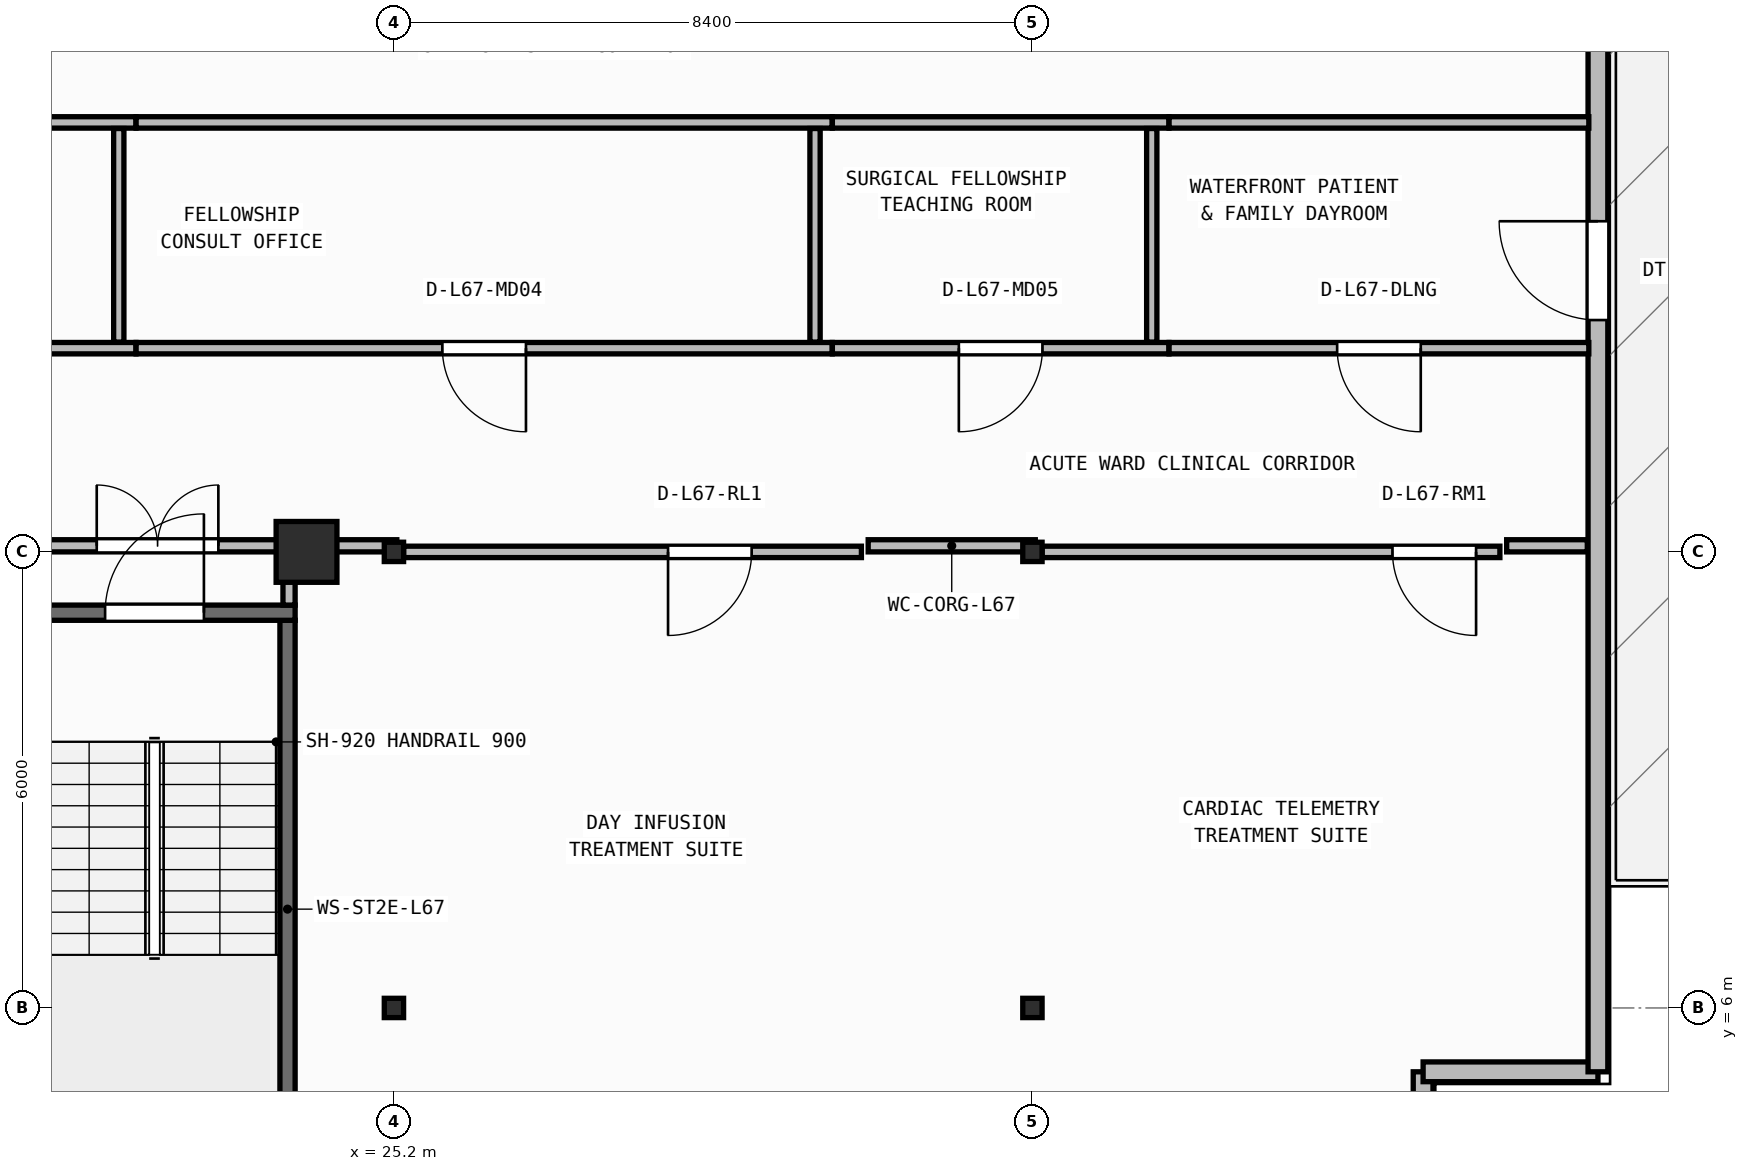
"""IFC4 building model, lengths in metres.
Left out: names, types, materials, properties, quantities, classifications, styles, units other than length and angle.
Written with IfcOpenShell. Run it as: python <this file> out.ifc"""

import sys

from ifc_helpers import new_model, si_unit, direction, frame, frame_2d, origin, origin_2d, place, context, subcontext, project, spatial, rectangle, i_section, extrude, element, fill, save


model = new_model("IFC4")
c1 = context("Model", 3, precision=1e-05, world=origin(), true_north=direction((0.0, 1.0)))
c2 = subcontext(c1, "Body", "Model", "MODEL_VIEW")
j1 = project(units=[si_unit("LENGTHUNIT", "METRE"), si_unit("PLANEANGLEUNIT", "RADIAN")], contexts=[c1])
p1 = place(None, origin())
s1 = spatial("IfcSite", under=j1, at=p1, CompositionType="ELEMENT")
p2 = place(p1, origin())
s2 = spatial("IfcBuilding", under=s1, at=p2, CompositionType="ELEMENT")
p3 = place(p2, frame((0.0, 0.0, 272.35)))
s3 = spatial("IfcBuildingStorey", under=s2, at=p3, CompositionType="ELEMENT", Elevation=272.35)
for number, where, z_axis, x_axis in (
    (1, (25.2, 6.0, 0.0), (0.0, 0.0, 1.0), (1.0, 0.0, 0.0)),
    (2, (33.6, 6.0, 0.0), (0.0, 0.0, 1.0), (1.0, 0.0, 0.0)),
):
    element("IfcColumn", number, at=place(p3, frame(where, z_axis=z_axis, x_axis=x_axis)), inside=s3, PredefinedType="COLUMN", context=c2, shape_type="SweptSolid", body=[
        extrude(i_section(OverallWidth=0.254, OverallDepth=0.254, WebThickness=0.009, FlangeThickness=0.014, FilletRadius=0.013, at=origin_2d()), origin(), (0.0, 0.0, 1.0), 3.95),
    ])
p4 = place(p3, frame((24.05, 12.0, 0.0), z_axis=(0.0, 0.0, 1.0), x_axis=(1.0, 0.0, 0.0)))
e3 = element("IfcColumn", 3, at=p4, inside=s3, PredefinedType="COLUMN", context=c2, shape_type="SweptSolid", body=[
    extrude(rectangle(XDim=0.8, YDim=0.8, at=origin_2d()), origin(), (0.0, 0.0, 1.0), 3.95),
])
for number, where, z_axis, x_axis in (
    (4, (25.2, 12.0, 0.0), (0.0, 0.0, 1.0), (1.0, 0.0, 0.0)),
    (5, (33.6, 12.0, 0.0), (0.0, 0.0, 1.0), (1.0, 0.0, 0.0)),
):
    element("IfcColumn", number, at=place(p3, frame(where, z_axis=z_axis, x_axis=x_axis)), inside=s3, PredefinedType="COLUMN", context=c2, shape_type="SweptSolid", body=[
        extrude(i_section(OverallWidth=0.254, OverallDepth=0.254, WebThickness=0.009, FlangeThickness=0.014, FilletRadius=0.013, at=origin_2d()), origin(), (0.0, 0.0, 1.0), 3.95),
    ])
p5 = place(p3, frame((38.74, 2.849, 0.0), z_axis=(0.0, 0.0, 1.0), x_axis=(0.0, 1.0, 0.0)))
e6 = element("IfcWall", 6, at=p5, inside=s3, PredefinedType="STANDARD", context=c2, shape_type="SweptSolid", body=[
    extrude(rectangle(XDim=2.311, YDim=0.26, at=frame_2d((1.156, 0.0))), origin(), (0.0, 0.0, 1.0), 3.71),
])
p6 = place(p3, frame((38.74, 5.16, 0.0), z_axis=(0.0, 0.0, 1.0), x_axis=(1.0, 0.0, 0.0)))
e7 = element("IfcWall", 7, at=p6, inside=s3, PredefinedType="STANDARD", context=c2, shape_type="SweptSolid", body=[
    extrude(rectangle(XDim=2.3, YDim=0.26, at=frame_2d((1.15, 0.0))), origin(), (0.0, 0.0, 1.0), 3.71),
])
p7 = place(p3, frame((41.04, 5.16, 0.0), z_axis=(0.0, 0.0, 1.0), x_axis=(0.0, 1.0, 0.0)))
e8 = element("IfcWall", 8, at=p7, inside=s3, PredefinedType="STANDARD", context=c2, shape_type="SweptSolid", body=[
    extrude(rectangle(XDim=21.08, YDim=0.26, at=frame_2d((10.54, 0.0))), origin(), (0.0, 0.0, 1.0), 3.71),
])
p8 = place(p7, frame((9.89, 0.0, 0.0)))
e9 = element("IfcOpeningElement", 9, at=p8, cuts=e8, PredefinedType="OPENING", context=c2, shape_type="SweptSolid", body=[
    extrude(rectangle(XDim=1.3, YDim=2.15, at=frame_2d((0.65, 1.075))), frame((0.0, 0.14, 0.0), z_axis=(0.0, -1.0, 0.0), x_axis=(1.0, 0.0, 0.0)), (0.0, 0.0, 1.0), 0.28),
])
p9 = place(p3, frame((23.8, 3.5, 0.0), z_axis=(0.0, 0.0, 1.0), x_axis=(0.0, 1.0, 0.0)))
e10 = element("IfcWall", 10, at=p9, inside=s3, PredefinedType="SHEAR", context=c2, shape_type="SweptSolid", body=[
    extrude(rectangle(XDim=7.6, YDim=0.2, at=frame_2d((3.8, 0.0))), origin(), (0.0, 0.0, 1.0), 3.71),
])
p10 = place(p3, frame((20.2, 11.2, 0.0), z_axis=(0.0, 0.0, 1.0), x_axis=(1.0, 0.0, 0.0)))
e11 = element("IfcWall", 11, at=p10, inside=s3, PredefinedType="SHEAR", context=c2, shape_type="SweptSolid", body=[
    extrude(rectangle(XDim=3.7, YDim=0.2, at=frame_2d((1.85, 0.0))), origin(), (0.0, 0.0, 1.0), 3.71),
])
p11 = place(p10, frame((1.2, 0.0, 0.0)))
e12 = element("IfcOpeningElement", 12, at=p11, cuts=e11, PredefinedType="OPENING", context=c2, shape_type="SweptSolid", body=[
    extrude(rectangle(XDim=1.3, YDim=2.15, at=frame_2d((0.65, 1.075))), frame((0.0, 0.11, 0.0), z_axis=(0.0, -1.0, 0.0), x_axis=(1.0, 0.0, 0.0)), (0.0, 0.0, 1.0), 0.22),
])
p12 = place(p3, frame((20.28, 12.08, 0.0), z_axis=(0.0, 0.0, 1.0), x_axis=(1.0, 0.0, 0.0)))
e13 = element("IfcWall", 13, at=p12, inside=s3, PredefinedType="PARTITIONING", context=c2, shape_type="SweptSolid", body=[
    extrude(rectangle(XDim=3.62, YDim=0.16, at=frame_2d((1.81, 0.0))), origin(), (0.0, 0.0, 1.0), 3.157),
])
p13 = place(p12, frame((1.01, 0.0, 0.0)))
e14 = element("IfcOpeningElement", 14, at=p13, cuts=e13, PredefinedType="OPENING", context=c2, shape_type="SweptSolid", body=[
    extrude(rectangle(XDim=1.6, YDim=2.05, at=frame_2d((0.8, 1.025))), frame((0.0, 0.09, 0.0), z_axis=(0.0, -1.0, 0.0), x_axis=(1.0, 0.0, 0.0)), (0.0, 0.0, 1.0), 0.18),
])
p14 = place(p3, frame((23.82, 11.3, 0.0), z_axis=(0.0, 0.0, 1.0), x_axis=(0.0, 1.0, 0.0)))
e15 = element("IfcWall", 15, at=p14, inside=s3, PredefinedType="PARTITIONING", context=c2, shape_type="SweptSolid", body=[
    extrude(rectangle(XDim=0.7, YDim=0.16, at=frame_2d((0.35, 0.0))), origin(), (0.0, 0.0, 1.0), 3.71),
])
p15 = place(p3, frame((31.35, 12.0, 0.0), z_axis=(0.0, 0.0, 1.0), x_axis=(-1.0, 0.0, 0.0)))
e16 = element("IfcWall", 16, at=p15, inside=s3, PredefinedType="PARTITIONING", context=c2, shape_type="SweptSolid", body=[
    extrude(rectangle(XDim=6.023, YDim=0.15, at=frame_2d((3.012, 0.0))), origin(), (0.0, 0.0, 1.0), 3.157),
])
p16 = place(p15, frame((1.444, 0.0, 0.0)))
e17 = element("IfcOpeningElement", 17, at=p16, cuts=e16, PredefinedType="OPENING", context=c2, shape_type="SweptSolid", body=[
    extrude(rectangle(XDim=1.1, YDim=2.1, at=frame_2d((0.55, 1.05))), frame((0.0, 0.085, 0.0), z_axis=(0.0, -1.0, 0.0), x_axis=(1.0, 0.0, 0.0)), (0.0, 0.0, 1.0), 0.17),
])
p17 = place(p3, frame((39.75, 12.0, 0.0), z_axis=(0.0, 0.0, 1.0), x_axis=(-1.0, 0.0, 0.0)))
e18 = element("IfcWall", 18, at=p17, inside=s3, PredefinedType="PARTITIONING", context=c2, shape_type="SweptSolid", body=[
    extrude(rectangle(XDim=6.023, YDim=0.15, at=frame_2d((3.011, 0.0))), origin(), (0.0, 0.0, 1.0), 3.71),
])
p18 = place(p17, frame((0.313, 0.0, 0.0)))
e19 = element("IfcOpeningElement", 19, at=p18, cuts=e18, PredefinedType="OPENING", context=c2, shape_type="SweptSolid", body=[
    extrude(rectangle(XDim=1.1, YDim=2.1, at=frame_2d((0.55, 1.05))), frame((0.0, 0.085, 0.0), z_axis=(0.0, -1.0, 0.0), x_axis=(1.0, 0.0, 0.0)), (0.0, 0.0, 1.0), 0.17),
])
p19 = place(p3, frame((21.806, 14.68, 0.0), z_axis=(0.0, 0.0, 1.0), x_axis=(-1.0, 0.0, 0.0)))
e20 = element("IfcWall", 20, at=p19, inside=s3, PredefinedType="PARTITIONING", context=c2, shape_type="SweptSolid", body=[
    extrude(rectangle(XDim=8.252, YDim=0.15, at=frame_2d((4.126, 0.0))), origin(), (0.0, 0.0, 1.0), 3.71),
])
p20 = place(p19, frame((3.576, 0.0, 0.0)))
e21 = element("IfcOpeningElement", 21, at=p20, cuts=e20, PredefinedType="OPENING", context=c2, shape_type="SweptSolid", body=[
    extrude(rectangle(XDim=1.1, YDim=2.1, at=frame_2d((0.55, 1.05))), frame((0.0, 0.085, 0.0), z_axis=(0.0, -1.0, 0.0), x_axis=(1.0, 0.0, 0.0)), (0.0, 0.0, 1.0), 0.17),
])
p21 = place(p3, frame((30.966, 14.68, 0.0), z_axis=(0.0, 0.0, 1.0), x_axis=(-1.0, 0.0, 0.0)))
e22 = element("IfcWall", 22, at=p21, inside=s3, PredefinedType="PARTITIONING", context=c2, shape_type="SweptSolid", body=[
    extrude(rectangle(XDim=9.158, YDim=0.15, at=frame_2d((4.579, 0.0))), origin(), (0.0, 0.0, 1.0), 3.71),
])
p22 = place(p21, frame((4.029, 0.0, 0.0)))
e23 = element("IfcOpeningElement", 23, at=p22, cuts=e22, PredefinedType="OPENING", context=c2, shape_type="SweptSolid", body=[
    extrude(rectangle(XDim=1.1, YDim=2.1, at=frame_2d((0.55, 1.05))), frame((0.0, 0.085, 0.0), z_axis=(0.0, -1.0, 0.0), x_axis=(1.0, 0.0, 0.0)), (0.0, 0.0, 1.0), 0.17),
])
p23 = place(p3, frame((35.396, 14.68, 0.0), z_axis=(0.0, 0.0, 1.0), x_axis=(-1.0, 0.0, 0.0)))
e24 = element("IfcWall", 24, at=p23, inside=s3, PredefinedType="PARTITIONING", context=c2, shape_type="SweptSolid", body=[
    extrude(rectangle(XDim=4.428, YDim=0.15, at=frame_2d((2.214, 0.0))), origin(), (0.0, 0.0, 1.0), 3.71),
])
p24 = place(p23, frame((1.664, 0.0, 0.0)))
e25 = element("IfcOpeningElement", 25, at=p24, cuts=e24, PredefinedType="OPENING", context=c2, shape_type="SweptSolid", body=[
    extrude(rectangle(XDim=1.1, YDim=2.1, at=frame_2d((0.55, 1.05))), frame((0.0, 0.085, 0.0), z_axis=(0.0, -1.0, 0.0), x_axis=(1.0, 0.0, 0.0)), (0.0, 0.0, 1.0), 0.17),
])
p25 = place(p3, frame((40.92, 14.68, 0.0), z_axis=(0.0, 0.0, 1.0), x_axis=(-1.0, 0.0, 0.0)))
e26 = element("IfcWall", 26, at=p25, inside=s3, PredefinedType="PARTITIONING", context=c2, shape_type="SweptSolid", body=[
    extrude(rectangle(XDim=5.522, YDim=0.15, at=frame_2d((2.761, 0.0))), origin(), (0.0, 0.0, 1.0), 3.71),
])
p26 = place(p25, frame((2.211, 0.0, 0.0)))
e27 = element("IfcOpeningElement", 27, at=p26, cuts=e26, PredefinedType="OPENING", context=c2, shape_type="SweptSolid", body=[
    extrude(rectangle(XDim=1.1, YDim=2.1, at=frame_2d((0.55, 1.05))), frame((0.0, 0.085, 0.0), z_axis=(0.0, -1.0, 0.0), x_axis=(1.0, 0.0, 0.0)), (0.0, 0.0, 1.0), 0.17),
])
p27 = place(p3, frame((13.72, 17.65, 0.0), z_axis=(0.0, 0.0, 1.0), x_axis=(1.0, 0.0, 0.0)))
e28 = element("IfcWall", 28, at=p27, inside=s3, PredefinedType="PARTITIONING", context=c2, shape_type="SweptSolid", body=[
    extrude(rectangle(XDim=8.086, YDim=0.15, at=frame_2d((4.043, 0.0))), origin(), (0.0, 0.0, 1.0), 3.71),
])
p28 = place(p3, frame((21.808, 17.65, 0.0), z_axis=(0.0, 0.0, 1.0), x_axis=(1.0, 0.0, 0.0)))
e29 = element("IfcWall", 29, at=p28, inside=s3, PredefinedType="PARTITIONING", context=c2, shape_type="SweptSolid", body=[
    extrude(rectangle(XDim=9.158, YDim=0.15, at=frame_2d((4.579, 0.0))), origin(), (0.0, 0.0, 1.0), 3.71),
])
p29 = place(p3, frame((30.968, 17.65, 0.0), z_axis=(0.0, 0.0, 1.0), x_axis=(1.0, 0.0, 0.0)))
e30 = element("IfcWall", 30, at=p29, inside=s3, PredefinedType="PARTITIONING", context=c2, shape_type="SweptSolid", body=[
    extrude(rectangle(XDim=4.428, YDim=0.15, at=frame_2d((2.214, 0.0))), origin(), (0.0, 0.0, 1.0), 3.71),
])
p30 = place(p3, frame((35.398, 17.65, 0.0), z_axis=(0.0, 0.0, 1.0), x_axis=(1.0, 0.0, 0.0)))
e31 = element("IfcWall", 31, at=p30, inside=s3, PredefinedType="PARTITIONING", context=c2, shape_type="SweptSolid", body=[
    extrude(rectangle(XDim=5.522, YDim=0.15, at=frame_2d((2.761, 0.0))), origin(), (0.0, 0.0, 1.0), 3.71),
])
for number, where, z_axis, x_axis in (
    (32, (21.58, 14.76, 0.0), (0.0, 0.0, 1.0), (0.0, 1.0, 0.0)),
    (33, (30.74, 14.76, 0.0), (0.0, 0.0, 1.0), (0.0, 1.0, 0.0)),
    (34, (35.17, 14.76, 0.0), (0.0, 0.0, 1.0), (0.0, 1.0, 0.0)),
):
    element("IfcWall", number, at=place(p3, frame(where, z_axis=z_axis, x_axis=x_axis)), inside=s3, PredefinedType="PARTITIONING", context=c2, shape_type="SweptSolid", body=[
        extrude(rectangle(XDim=2.81, YDim=0.135, at=frame_2d((1.405, 0.0))), origin(), (0.0, 0.0, 1.0), 3.71),
    ])
p31 = place(p3, frame((24.02, 12.08, 0.0), z_axis=(0.0, 0.0, 1.0), x_axis=(1.0, 0.0, 0.0)))
e35 = element("IfcWall", 35, at=p31, inside=s3, PredefinedType="PARTITIONING", context=c2, shape_type="SweptSolid", body=[
    extrude(rectangle(XDim=1.218, YDim=0.16, at=frame_2d((0.609, 0.0))), origin(), (0.0, 0.0, 1.0), 3.157),
])
p32 = place(p3, frame((31.439, 12.08, 0.0), z_axis=(0.0, 0.0, 1.0), x_axis=(1.0, 0.0, 0.0)))
e36 = element("IfcWall", 36, at=p32, inside=s3, PredefinedType="PARTITIONING", context=c2, shape_type="SweptSolid", body=[
    extrude(rectangle(XDim=2.198, YDim=0.16, at=frame_2d((1.099, 0.0))), origin(), (0.0, 0.0, 1.0), 3.157),
])
p33 = place(p3, frame((39.839, 12.08, 0.0), z_axis=(0.0, 0.0, 1.0), x_axis=(1.0, 0.0, 0.0)))
e37 = element("IfcWall", 37, at=p33, inside=s3, PredefinedType="PARTITIONING", context=c2, shape_type="SweptSolid", body=[
    extrude(rectangle(XDim=1.061, YDim=0.16, at=frame_2d((0.53, 0.0))), origin(), (0.0, 0.0, 1.0), 3.71),
])
p34 = place(p8, origin())
e38 = element("IfcDoor", 38, at=p34, inside=s3, OperationType="SINGLE_SWING_RIGHT", PredefinedType="DOOR", context=c2, shape_type="SweptSolid", body=[
    extrude(rectangle(XDim=1.3, YDim=2.15, at=frame_2d((0.65, 1.075))), frame((0.0, 0.025, 0.0), z_axis=(0.0, -1.0, 0.0), x_axis=(1.0, 0.0, 0.0)), (0.0, 0.0, 1.0), 0.05),
])
fill(e9, e38)
p35 = place(p11, origin())
e39 = element("IfcDoor", 39, at=p35, inside=s3, OperationType="SINGLE_SWING_RIGHT", PredefinedType="DOOR", context=c2, shape_type="SweptSolid", body=[
    extrude(rectangle(XDim=1.3, YDim=2.15, at=frame_2d((0.65, 1.075))), frame((0.0, 0.025, 0.0), z_axis=(0.0, -1.0, 0.0), x_axis=(1.0, 0.0, 0.0)), (0.0, 0.0, 1.0), 0.05),
])
fill(e12, e39)
p36 = place(p13, origin())
e40 = element("IfcDoor", 40, at=p36, inside=s3, OperationType="DOUBLE_DOOR_SINGLE_SWING", PredefinedType="DOOR", context=c2, shape_type="SweptSolid", body=[
    extrude(rectangle(XDim=1.6, YDim=2.05, at=frame_2d((0.8, 1.025))), frame((0.0, 0.025, 0.0), z_axis=(0.0, -1.0, 0.0), x_axis=(1.0, 0.0, 0.0)), (0.0, 0.0, 1.0), 0.05),
])
fill(e14, e40)
p37 = place(p16, origin())
e41 = element("IfcDoor", 41, at=p37, inside=s3, OperationType="SINGLE_SWING_RIGHT", PredefinedType="DOOR", context=c2, shape_type="SweptSolid", body=[
    extrude(rectangle(XDim=1.1, YDim=2.1, at=frame_2d((0.55, 1.05))), frame((0.0, 0.025, 0.0), z_axis=(0.0, -1.0, 0.0), x_axis=(1.0, 0.0, 0.0)), (0.0, 0.0, 1.0), 0.05),
])
fill(e17, e41)
p38 = place(p18, origin())
e42 = element("IfcDoor", 42, at=p38, inside=s3, OperationType="SINGLE_SWING_LEFT", PredefinedType="DOOR", context=c2, shape_type="SweptSolid", body=[
    extrude(rectangle(XDim=1.1, YDim=2.1, at=frame_2d((0.55, 1.05))), frame((0.0, 0.025, 0.0), z_axis=(0.0, -1.0, 0.0), x_axis=(1.0, 0.0, 0.0)), (0.0, 0.0, 1.0), 0.05),
])
fill(e19, e42)
p39 = place(p22, origin())
e43 = element("IfcDoor", 43, at=p39, inside=s3, OperationType="SINGLE_SWING_LEFT", PredefinedType="DOOR", context=c2, shape_type="SweptSolid", body=[
    extrude(rectangle(XDim=1.1, YDim=2.1, at=frame_2d((0.55, 1.05))), frame((0.0, 0.025, 0.0), z_axis=(0.0, -1.0, 0.0), x_axis=(1.0, 0.0, 0.0)), (0.0, 0.0, 1.0), 0.05),
])
fill(e23, e43)
p40 = place(p24, origin())
e44 = element("IfcDoor", 44, at=p40, inside=s3, OperationType="SINGLE_SWING_RIGHT", PredefinedType="DOOR", context=c2, shape_type="SweptSolid", body=[
    extrude(rectangle(XDim=1.1, YDim=2.1, at=frame_2d((0.55, 1.05))), frame((0.0, 0.025, 0.0), z_axis=(0.0, -1.0, 0.0), x_axis=(1.0, 0.0, 0.0)), (0.0, 0.0, 1.0), 0.05),
])
fill(e25, e44)
p41 = place(p26, origin())
e45 = element("IfcDoor", 45, at=p41, inside=s3, OperationType="SINGLE_SWING_LEFT", PredefinedType="DOOR", context=c2, shape_type="SweptSolid", body=[
    extrude(rectangle(XDim=1.1, YDim=2.1, at=frame_2d((0.55, 1.05))), frame((0.0, 0.025, 0.0), z_axis=(0.0, -1.0, 0.0), x_axis=(1.0, 0.0, 0.0)), (0.0, 0.0, 1.0), 0.05),
])
fill(e27, e45)
save(model, sys.argv[1])
